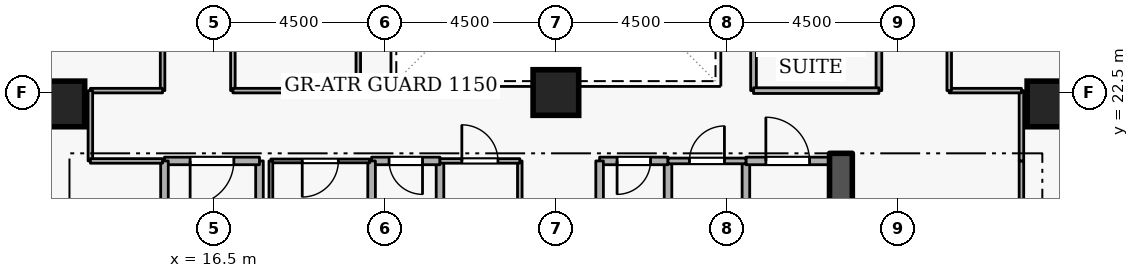
"""IFC4 building model, lengths in metres.
Left out: names, types, materials, properties, quantities, classifications, styles, units other than length and angle.
Written with IfcOpenShell. Run it as: python <this file> out.ifc"""

import sys

from ifc_helpers import new_model, si_unit, direction, frame, frame_2d, origin, origin_2d, place, context, subcontext, project, spatial, rectangle, extrude, element, fill, save


model = new_model("IFC4")
c1 = context("Model", 3, precision=1e-05, world=origin(), true_north=direction((0.0, 1.0)))
c2 = subcontext(c1, "Body", "Model", "MODEL_VIEW")
j1 = project(units=[si_unit("LENGTHUNIT", "METRE"), si_unit("PLANEANGLEUNIT", "RADIAN")], contexts=[c1])
p1 = place(None, origin())
s1 = spatial("IfcSite", under=j1, at=p1, CompositionType="ELEMENT")
p2 = place(p1, origin())
s2 = spatial("IfcBuilding", under=s1, at=p2, CompositionType="ELEMENT")
p3 = place(p2, frame((0.0, 0.0, 87.3)))
s3 = spatial("IfcBuildingStorey", under=s2, at=p3, CompositionType="ELEMENT", Elevation=87.3)
p4 = place(p3, frame((33.0, 15.2, 0.0), z_axis=(0.0, 0.0, 1.0), x_axis=(0.0, 1.0, 0.0)))
e1 = element("IfcWall", 1, at=p4, inside=s3, PredefinedType="SHEAR", context=c2, shape_type="SweptSolid", body=[
    extrude(rectangle(XDim=5.7, YDim=0.6, at=frame_2d((2.85, 0.0))), origin(), (0.0, 0.0, 1.0), 3.6),
])
for number, where, z_axis, x_axis in (
    (2, (12.5, 22.2, 0.0), (0.0, 0.0, 1.0), (1.0, 0.0, 0.0)),
    (3, (38.5, 22.2, 0.0), (0.0, 0.0, 1.0), (1.0, 0.0, 0.0)),
    (4, (25.5, 22.5, 0.0), (0.0, 0.0, 1.0), (1.0, 0.0, 0.0)),
):
    element("IfcColumn", number, at=place(p3, frame(where, z_axis=z_axis, x_axis=x_axis)), inside=s3, PredefinedType="COLUMN", context=c2, shape_type="SweptSolid", body=[
        extrude(rectangle(XDim=1.2, YDim=1.2, at=origin_2d()), origin(), (0.0, 0.0, 1.0), 3.6),
    ])
p5 = place(p3, frame((17.7, 18.4, 0.0), z_axis=(0.0, 0.0, 1.0), x_axis=(0.0, 1.0, 0.0)))
e5 = element("IfcWall", 5, at=p5, inside=s3, PredefinedType="STANDARD", context=c2, shape_type="SweptSolid", body=[
    extrude(rectangle(XDim=2.3, YDim=0.2, at=frame_2d((1.15, 0.0))), origin(), (0.0, 0.0, 1.0), 2.545),
])
p6 = place(p3, frame((17.7, 20.7, 0.0), z_axis=(0.0, 0.0, 1.0), x_axis=(-1.0, 0.0, 0.0)))
e6 = element("IfcWall", 6, at=p6, inside=s3, PredefinedType="STANDARD", context=c2, shape_type="SweptSolid", body=[
    extrude(rectangle(XDim=2.5, YDim=0.2, at=frame_2d((1.25, 0.0))), origin(), (0.0, 0.0, 1.0), 3.34),
])
p7 = place(p6, frame((0.675, 0.0, 0.0)))
e7 = element("IfcOpeningElement", 7, at=p7, cuts=e6, PredefinedType="OPENING", context=c2, shape_type="SweptSolid", body=[
    extrude(rectangle(XDim=1.15, YDim=2.1, at=frame_2d((0.575, 1.05))), frame((0.0, 0.11, 0.0), z_axis=(0.0, -1.0, 0.0), x_axis=(1.0, 0.0, 0.0)), (0.0, 0.0, 1.0), 0.22),
])
p8 = place(p3, frame((15.2, 20.7, 0.0), z_axis=(0.0, 0.0, 1.0), x_axis=(0.0, -1.0, 0.0)))
e8 = element("IfcWall", 8, at=p8, inside=s3, PredefinedType="STANDARD", context=c2, shape_type="SweptSolid", body=[
    extrude(rectangle(XDim=5.7, YDim=0.2, at=frame_2d((2.85, 0.0))), origin(), (0.0, 0.0, 1.0), 3.34),
])
p9 = place(p3, frame((28.45, 18.65, 0.0), z_axis=(0.0, 0.0, 1.0), x_axis=(0.0, 1.0, 0.0)))
e9 = element("IfcWall", 9, at=p9, inside=s3, PredefinedType="STANDARD", context=c2, shape_type="SweptSolid", body=[
    extrude(rectangle(XDim=2.05, YDim=0.2, at=frame_2d((1.025, 0.0))), origin(), (0.0, 0.0, 1.0), 3.34),
])
p10 = place(p3, frame((28.45, 20.7, 0.0), z_axis=(0.0, 0.0, 1.0), x_axis=(-1.0, 0.0, 0.0)))
e10 = element("IfcWall", 10, at=p10, inside=s3, PredefinedType="STANDARD", context=c2, shape_type="SweptSolid", body=[
    extrude(rectangle(XDim=1.8, YDim=0.2, at=frame_2d((0.9, 0.0))), origin(), (0.0, 0.0, 1.0), 3.34),
])
p11 = place(p10, frame((0.46, 0.0, 0.0)))
e11 = element("IfcOpeningElement", 11, at=p11, cuts=e10, PredefinedType="OPENING", context=c2, shape_type="SweptSolid", body=[
    extrude(rectangle(XDim=0.88, YDim=2.04, at=frame_2d((0.44, 1.02))), frame((0.0, 0.11, 0.0), z_axis=(0.0, -1.0, 0.0), x_axis=(1.0, 0.0, 0.0)), (0.0, 0.0, 1.0), 0.22),
])
for number, where, z_axis, x_axis in (
    (12, (26.65, 20.7, 0.0), (0.0, 0.0, 1.0), (0.0, -1.0, 0.0)),
    (13, (22.45, 18.65, 0.0), (0.0, 0.0, 1.0), (0.0, 1.0, 0.0)),
):
    element("IfcWall", number, at=place(p3, frame(where, z_axis=z_axis, x_axis=x_axis)), inside=s3, PredefinedType="STANDARD", context=c2, shape_type="SweptSolid", body=[
        extrude(rectangle(XDim=2.05, YDim=0.2, at=frame_2d((1.025, 0.0))), origin(), (0.0, 0.0, 1.0), 3.34),
    ])
p12 = place(p3, frame((22.45, 20.7, 0.0), z_axis=(0.0, 0.0, 1.0), x_axis=(-1.0, 0.0, 0.0)))
e14 = element("IfcWall", 14, at=p12, inside=s3, PredefinedType="STANDARD", context=c2, shape_type="SweptSolid", body=[
    extrude(rectangle(XDim=1.8, YDim=0.2, at=frame_2d((0.9, 0.0))), origin(), (0.0, 0.0, 1.0), 3.34),
])
p13 = place(p12, frame((0.46, 0.0, 0.0)))
e15 = element("IfcOpeningElement", 15, at=p13, cuts=e14, PredefinedType="OPENING", context=c2, shape_type="SweptSolid", body=[
    extrude(rectangle(XDim=0.88, YDim=2.04, at=frame_2d((0.44, 1.02))), frame((0.0, 0.11, 0.0), z_axis=(0.0, -1.0, 0.0), x_axis=(1.0, 0.0, 0.0)), (0.0, 0.0, 1.0), 0.22),
])
for number, where, z_axis, x_axis in (
    (16, (20.65, 20.7, 0.0), (0.0, 0.0, 1.0), (0.0, -1.0, 0.0)),
    (17, (30.5, 18.65, 0.0), (0.0, 0.0, 1.0), (0.0, 1.0, 0.0)),
):
    element("IfcWall", number, at=place(p3, frame(where, z_axis=z_axis, x_axis=x_axis)), inside=s3, PredefinedType="STANDARD", context=c2, shape_type="SweptSolid", body=[
        extrude(rectangle(XDim=2.05, YDim=0.2, at=frame_2d((1.025, 0.0))), origin(), (0.0, 0.0, 1.0), 3.34),
    ])
p14 = place(p3, frame((30.5, 20.7, 0.0), z_axis=(0.0, 0.0, 1.0), x_axis=(1.0, 0.0, 0.0)))
e18 = element("IfcWall", 18, at=p14, inside=s3, PredefinedType="STANDARD", context=c2, shape_type="SweptSolid", body=[
    extrude(rectangle(XDim=2.2, YDim=0.2, at=frame_2d((1.1, 0.0))), origin(), (0.0, 0.0, 1.0), 3.34),
])
p15 = place(p14, frame((0.525, 0.0, 0.0)))
e19 = element("IfcOpeningElement", 19, at=p15, cuts=e18, PredefinedType="OPENING", context=c2, shape_type="SweptSolid", body=[
    extrude(rectangle(XDim=1.15, YDim=2.1, at=frame_2d((0.575, 1.05))), frame((0.0, 0.11, 0.0), z_axis=(0.0, -1.0, 0.0), x_axis=(1.0, 0.0, 0.0)), (0.0, 0.0, 1.0), 0.22),
])
p16 = place(p3, frame((20.6, 20.7, 0.0), z_axis=(0.0, 0.0, 1.0), x_axis=(-1.0, 0.0, 0.0)))
e20 = element("IfcWall", 20, at=p16, inside=s3, PredefinedType="PARTITIONING", context=c2, shape_type="SweptSolid", body=[
    extrude(rectangle(XDim=2.6, YDim=0.1, at=frame_2d((1.3, 0.0))), origin(), (0.0, 0.0, 1.0), 3.34),
])
p17 = place(p16, frame((0.825, 0.0, 0.0)))
e21 = element("IfcOpeningElement", 21, at=p17, cuts=e20, PredefinedType="OPENING", context=c2, shape_type="SweptSolid", body=[
    extrude(rectangle(XDim=0.95, YDim=2.1, at=frame_2d((0.475, 1.05))), frame((0.0, 0.06, 0.0), z_axis=(0.0, -1.0, 0.0), x_axis=(1.0, 0.0, 0.0)), (0.0, 0.0, 1.0), 0.12),
])
p18 = place(p3, frame((18.0, 20.7, 0.0), z_axis=(0.0, 0.0, 1.0), x_axis=(0.0, -1.0, 0.0)))
e22 = element("IfcWall", 22, at=p18, inside=s3, PredefinedType="PARTITIONING", context=c2, shape_type="SweptSolid", body=[
    extrude(rectangle(XDim=2.05, YDim=0.1, at=frame_2d((1.025, 0.0))), origin(), (0.0, 0.0, 1.0), 2.545),
])
p19 = place(p3, frame((24.55, 20.7, 0.0), z_axis=(0.0, 0.0, 1.0), x_axis=(0.0, -1.0, 0.0)))
e23 = element("IfcWall", 23, at=p19, inside=s3, PredefinedType="PARTITIONING", context=c2, shape_type="SweptSolid", body=[
    extrude(rectangle(XDim=2.05, YDim=0.12, at=frame_2d((1.025, 0.0))), origin(), (0.0, 0.0, 1.0), 3.34),
])
p20 = place(p3, frame((22.45, 20.7, 0.0), z_axis=(0.0, 0.0, 1.0), x_axis=(1.0, 0.0, 0.0)))
e24 = element("IfcWall", 24, at=p20, inside=s3, PredefinedType="PARTITIONING", context=c2, shape_type="SweptSolid", body=[
    extrude(rectangle(XDim=2.1, YDim=0.12, at=frame_2d((1.05, 0.0))), origin(), (0.0, 0.0, 1.0), 3.34),
])
p21 = place(p20, frame((0.575, 0.0, 0.0)))
e25 = element("IfcOpeningElement", 25, at=p21, cuts=e24, PredefinedType="OPENING", context=c2, shape_type="SweptSolid", body=[
    extrude(rectangle(XDim=0.95, YDim=2.1, at=frame_2d((0.475, 1.05))), frame((0.0, 0.07, 0.0), z_axis=(0.0, -1.0, 0.0), x_axis=(1.0, 0.0, 0.0)), (0.0, 0.0, 1.0), 0.14),
])
p22 = place(p3, frame((28.45, 20.7, 0.0), z_axis=(0.0, 0.0, 1.0), x_axis=(1.0, 0.0, 0.0)))
e26 = element("IfcWall", 26, at=p22, inside=s3, PredefinedType="PARTITIONING", context=c2, shape_type="SweptSolid", body=[
    extrude(rectangle(XDim=2.05, YDim=0.15, at=frame_2d((1.025, 0.0))), origin(), (0.0, 0.0, 1.0), 3.34),
])
p23 = place(p22, frame((0.565, 0.0, 0.0)))
e27 = element("IfcOpeningElement", 27, at=p23, cuts=e26, PredefinedType="OPENING", context=c2, shape_type="SweptSolid", body=[
    extrude(rectangle(XDim=0.92, YDim=2.08, at=frame_2d((0.46, 1.04))), frame((0.0, 0.085, 0.0), z_axis=(0.0, -1.0, 0.0), x_axis=(1.0, 0.0, 0.0)), (0.0, 0.0, 1.0), 0.17),
])
p24 = place(p3, frame((15.15, 27.0, 0.0), z_axis=(0.0, 0.0, 1.0), x_axis=(0.0, -1.0, 0.0)))
e28 = element("IfcWall", 28, at=p24, inside=s3, PredefinedType="PARTITIONING", context=c2, shape_type="SweptSolid", body=[
    extrude(rectangle(XDim=4.45, YDim=0.12, at=frame_2d((2.225, 0.0))), origin(), (0.0, 0.0, 1.0), 3.34),
])
p25 = place(p24, frame((1.7, 0.0, 0.0)))
e29 = element("IfcOpeningElement", 29, at=p25, cuts=e28, PredefinedType="OPENING", context=c2, shape_type="SweptSolid", body=[
    extrude(rectangle(XDim=1.05, YDim=2.1, at=frame_2d((0.525, 1.05))), frame((0.0, 0.07, 0.0), z_axis=(0.0, -1.0, 0.0), x_axis=(1.0, 0.0, 0.0)), (0.0, 0.0, 1.0), 0.14),
])
p26 = place(p3, frame((15.15, 22.55, 0.0), z_axis=(0.0, 0.0, 1.0), x_axis=(-1.0, 0.0, 0.0)))
e30 = element("IfcWall", 30, at=p26, inside=s3, PredefinedType="PARTITIONING", context=c2, shape_type="SweptSolid", body=[
    extrude(rectangle(XDim=1.9, YDim=0.12, at=frame_2d((0.95, 0.0))), origin(), (0.0, 0.0, 1.0), 3.34),
])
p27 = place(p3, frame((13.25, 22.55, 0.0), z_axis=(0.0, 0.0, 1.0), x_axis=(0.0, -1.0, 0.0)))
e31 = element("IfcWall", 31, at=p27, inside=s3, PredefinedType="PARTITIONING", context=c2, shape_type="SweptSolid", body=[
    extrude(rectangle(XDim=1.85, YDim=0.12, at=frame_2d((0.925, 0.0))), origin(), (0.0, 0.0, 1.0), 3.34),
])
p28 = place(p3, frame((13.25, 20.7, 0.0), z_axis=(0.0, 0.0, 1.0), x_axis=(1.0, 0.0, 0.0)))
e32 = element("IfcWall", 32, at=p28, inside=s3, PredefinedType="PARTITIONING", context=c2, shape_type="SweptSolid", body=[
    extrude(rectangle(XDim=1.9, YDim=0.12, at=frame_2d((0.95, 0.0))), origin(), (0.0, 0.0, 1.0), 3.34),
])
p29 = place(p3, frame((37.75, 17.55, 0.0), z_axis=(0.0, 0.0, 1.0), x_axis=(0.0, 1.0, 0.0)))
e33 = element("IfcWall", 33, at=p29, inside=s3, PredefinedType="PARTITIONING", context=c2, shape_type="SweptSolid", body=[
    extrude(rectangle(XDim=3.15, YDim=0.12, at=frame_2d((1.575, 0.0))), origin(), (0.0, 0.0, 1.0), 3.34),
])
p30 = place(p3, frame((37.75, 20.7, 0.0), z_axis=(0.0, 0.0, 1.0), x_axis=(0.0, 1.0, 0.0)))
e34 = element("IfcWall", 34, at=p30, inside=s3, PredefinedType="PARTITIONING", context=c2, shape_type="SweptSolid", body=[
    extrude(rectangle(XDim=1.85, YDim=0.12, at=frame_2d((0.925, 0.0))), origin(), (0.0, 0.0, 1.0), 3.34),
])
p31 = place(p3, frame((37.75, 22.55, 0.0), z_axis=(0.0, 0.0, 1.0), x_axis=(-1.0, 0.0, 0.0)))
e35 = element("IfcWall", 35, at=p31, inside=s3, PredefinedType="PARTITIONING", context=c2, shape_type="SweptSolid", body=[
    extrude(rectangle(XDim=1.9, YDim=0.12, at=frame_2d((0.95, 0.0))), origin(), (0.0, 0.0, 1.0), 3.34),
])
p32 = place(p3, frame((35.85, 22.55, 0.0), z_axis=(0.0, 0.0, 1.0), x_axis=(0.0, 1.0, 0.0)))
e36 = element("IfcWall", 36, at=p32, inside=s3, PredefinedType="PARTITIONING", context=c2, shape_type="SweptSolid", body=[
    extrude(rectangle(XDim=4.45, YDim=0.12, at=frame_2d((2.225, 0.0))), origin(), (0.0, 0.0, 1.0), 3.34),
])
p33 = place(p32, frame((1.7, 0.0, 0.0)))
e37 = element("IfcOpeningElement", 37, at=p33, cuts=e36, PredefinedType="OPENING", context=c2, shape_type="SweptSolid", body=[
    extrude(rectangle(XDim=1.05, YDim=2.1, at=frame_2d((0.525, 1.05))), frame((0.0, 0.07, 0.0), z_axis=(0.0, -1.0, 0.0), x_axis=(1.0, 0.0, 0.0)), (0.0, 0.0, 1.0), 0.14),
])
p34 = place(p3, frame((30.7, 22.55, 0.0), z_axis=(0.0, 0.0, 1.0), x_axis=(0.0, 1.0, 0.0)))
e38 = element("IfcWall", 38, at=p34, inside=s3, PredefinedType="PARTITIONING", context=c2, shape_type="SweptSolid", body=[
    extrude(rectangle(XDim=8.9, YDim=0.15, at=frame_2d((4.45, 0.0))), origin(), (0.0, 0.0, 1.0), 3.34),
])
p35 = place(p3, frame((34.0, 31.45, 0.0), z_axis=(0.0, 0.0, 1.0), x_axis=(0.0, -1.0, 0.0)))
e39 = element("IfcWall", 39, at=p35, inside=s3, PredefinedType="PARTITIONING", context=c2, shape_type="SweptSolid", body=[
    extrude(rectangle(XDim=8.9, YDim=0.15, at=frame_2d((4.45, 0.0))), origin(), (0.0, 0.0, 1.0), 3.34),
])
p36 = place(p35, frame((3.8, 0.0, 0.0)))
e40 = element("IfcOpeningElement", 40, at=p36, cuts=e39, PredefinedType="OPENING", context=c2, shape_type="SweptSolid", body=[
    extrude(rectangle(XDim=1.3, YDim=2.12, at=frame_2d((0.65, 1.06))), frame((0.0, 0.085, 0.0), z_axis=(0.0, -1.0, 0.0), x_axis=(1.0, 0.0, 0.0)), (0.0, 0.0, 1.0), 0.17),
])
p37 = place(p3, frame((34.0, 22.55, 0.0), z_axis=(0.0, 0.0, 1.0), x_axis=(-1.0, 0.0, 0.0)))
e41 = element("IfcWall", 41, at=p37, inside=s3, PredefinedType="PARTITIONING", context=c2, shape_type="SweptSolid", body=[
    extrude(rectangle(XDim=3.3, YDim=0.15, at=frame_2d((1.65, 0.0))), origin(), (0.0, 0.0, 1.0), 3.34),
])
p38 = place(p3, frame((17.0, 22.55, 0.0), z_axis=(0.0, 0.0, 1.0), x_axis=(0.0, 1.0, 0.0)))
e42 = element("IfcWall", 42, at=p38, inside=s3, PredefinedType="PARTITIONING", context=c2, shape_type="SweptSolid", body=[
    extrude(rectangle(XDim=8.9, YDim=0.12, at=frame_2d((4.45, 0.0))), origin(), (0.0, 0.0, 1.0), 3.34),
])
p39 = place(p38, frame((3.975, 0.0, 0.0)))
e43 = element("IfcOpeningElement", 43, at=p39, cuts=e42, PredefinedType="OPENING", context=c2, shape_type="SweptSolid", body=[
    extrude(rectangle(XDim=0.95, YDim=2.1, at=frame_2d((0.475, 1.05))), frame((0.0, 0.07, 0.0), z_axis=(0.0, -1.0, 0.0), x_axis=(1.0, 0.0, 0.0)), (0.0, 0.0, 1.0), 0.14),
])
p40 = place(p3, frame((20.3, 31.45, 0.0), z_axis=(0.0, 0.0, 1.0), x_axis=(0.0, -1.0, 0.0)))
e44 = element("IfcWall", 44, at=p40, inside=s3, PredefinedType="PARTITIONING", context=c2, shape_type="SweptSolid", body=[
    extrude(rectangle(XDim=8.9, YDim=0.12, at=frame_2d((4.45, 0.0))), origin(), (0.0, 0.0, 1.0), 3.34),
])
p41 = place(p3, frame((20.3, 22.55, 0.0), z_axis=(0.0, 0.0, 1.0), x_axis=(-1.0, 0.0, 0.0)))
e45 = element("IfcWall", 45, at=p41, inside=s3, PredefinedType="PARTITIONING", context=c2, shape_type="SweptSolid", body=[
    extrude(rectangle(XDim=3.3, YDim=0.12, at=frame_2d((1.65, 0.0))), origin(), (0.0, 0.0, 1.0), 3.34),
])
p42 = place(p7, origin())
e46 = element("IfcDoor", 46, at=p42, inside=s3, OperationType="SINGLE_SWING_RIGHT", PredefinedType="DOOR", context=c2, shape_type="SweptSolid", body=[
    extrude(rectangle(XDim=1.15, YDim=2.1, at=frame_2d((0.575, 1.05))), frame((0.0, 0.025, 0.0), z_axis=(0.0, -1.0, 0.0), x_axis=(1.0, 0.0, 0.0)), (0.0, 0.0, 1.0), 0.05),
])
fill(e7, e46)
p43 = place(p11, origin())
e47 = element("IfcDoor", 47, at=p43, inside=s3, OperationType="SINGLE_SWING_RIGHT", PredefinedType="DOOR", context=c2, shape_type="SweptSolid", body=[
    extrude(rectangle(XDim=0.88, YDim=2.04, at=frame_2d((0.44, 1.02))), frame((0.0, 0.025, 0.0), z_axis=(0.0, -1.0, 0.0), x_axis=(1.0, 0.0, 0.0)), (0.0, 0.0, 1.0), 0.05),
])
fill(e11, e47)
p44 = place(p13, origin())
e48 = element("IfcDoor", 48, at=p44, inside=s3, OperationType="SINGLE_SWING_LEFT", PredefinedType="DOOR", context=c2, shape_type="SweptSolid", body=[
    extrude(rectangle(XDim=0.88, YDim=2.04, at=frame_2d((0.44, 1.02))), frame((0.0, 0.025, 0.0), z_axis=(0.0, -1.0, 0.0), x_axis=(1.0, 0.0, 0.0)), (0.0, 0.0, 1.0), 0.05),
])
fill(e15, e48)
p45 = place(p17, origin())
e49 = element("IfcDoor", 49, at=p45, inside=s3, OperationType="SINGLE_SWING_RIGHT", PredefinedType="DOOR", context=c2, shape_type="SweptSolid", body=[
    extrude(rectangle(XDim=0.95, YDim=2.1, at=frame_2d((0.475, 1.05))), frame((0.0, 0.025, 0.0), z_axis=(0.0, -1.0, 0.0), x_axis=(1.0, 0.0, 0.0)), (0.0, 0.0, 1.0), 0.05),
])
fill(e21, e49)
p46 = place(p21, origin())
e50 = element("IfcDoor", 50, at=p46, inside=s3, OperationType="SINGLE_SWING_LEFT", PredefinedType="DOOR", context=c2, shape_type="SweptSolid", body=[
    extrude(rectangle(XDim=0.95, YDim=2.1, at=frame_2d((0.475, 1.05))), frame((0.0, 0.025, 0.0), z_axis=(0.0, -1.0, 0.0), x_axis=(1.0, 0.0, 0.0)), (0.0, 0.0, 1.0), 0.05),
])
fill(e25, e50)
p47 = place(p23, origin())
e51 = element("IfcDoor", 51, at=p47, inside=s3, OperationType="SINGLE_SWING_RIGHT", PredefinedType="DOOR", context=c2, shape_type="SweptSolid", body=[
    extrude(rectangle(XDim=0.92, YDim=2.08, at=frame_2d((0.46, 1.04))), frame((0.0, 0.025, 0.0), z_axis=(0.0, -1.0, 0.0), x_axis=(1.0, 0.0, 0.0)), (0.0, 0.0, 1.0), 0.05),
])
fill(e27, e51)
p48 = place(p15, origin())
e52 = element("IfcDoor", 52, at=p48, inside=s3, OperationType="SINGLE_SWING_LEFT", PredefinedType="DOOR", context=c2, shape_type="SweptSolid", body=[
    extrude(rectangle(XDim=1.15, YDim=2.1, at=frame_2d((0.575, 1.05))), frame((0.0, 0.025, 0.0), z_axis=(0.0, -1.0, 0.0), x_axis=(1.0, 0.0, 0.0)), (0.0, 0.0, 1.0), 0.05),
])
fill(e19, e52)
save(model, sys.argv[1])
